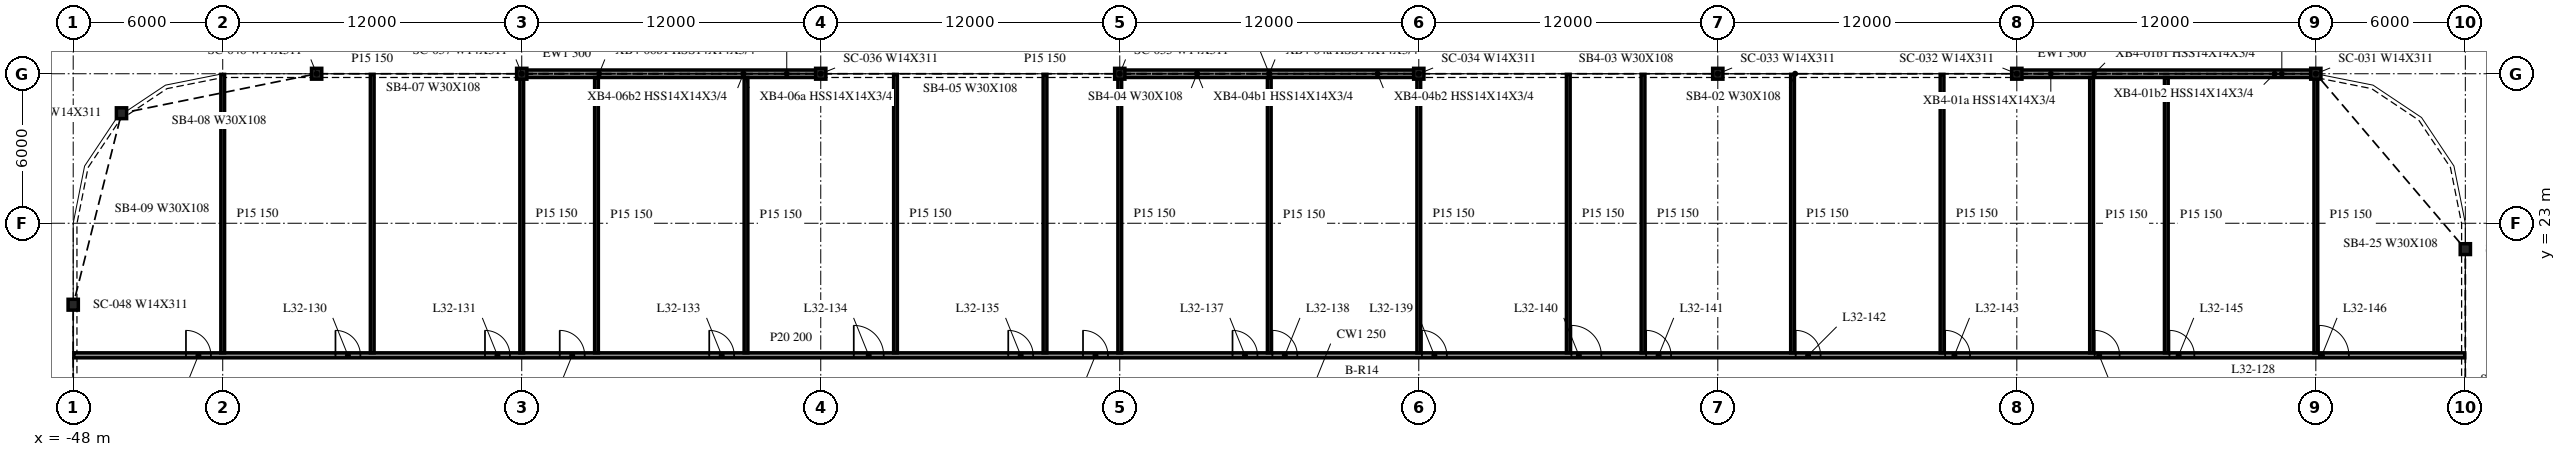
"""IFC4 building model, lengths in metres.
Left out: names, types, materials, properties, quantities, classifications, styles, units other than length and angle.
Written with IfcOpenShell. Run it as: python <this file> out.ifc"""

import sys

from ifc_helpers import new_model, si_unit, direction, frame, frame_2d, origin, origin_2d, place, context, subcontext, project, spatial, rectangle, i_section, extrude, element, fill, save


model = new_model("IFC4")
c1 = context("Model", 3, precision=1e-05, world=origin(), true_north=direction((0.0, 1.0)))
c2 = subcontext(c1, "Body", "Model", "MODEL_VIEW")
j1 = project(units=[si_unit("LENGTHUNIT", "METRE"), si_unit("PLANEANGLEUNIT", "RADIAN")], contexts=[c1])
p1 = place(None, origin())
s1 = spatial("IfcSite", under=j1, at=p1, CompositionType="ELEMENT")
p2 = place(p1, origin())
s2 = spatial("IfcBuilding", under=s1, at=p2, CompositionType="ELEMENT")
p3 = place(p2, frame((0.0, 0.0, 138.4)))
s3 = spatial("IfcBuildingStorey", under=s2, at=p3, CompositionType="ELEMENT", Elevation=138.4)
for number, where, z_axis, x_axis in (
    (1, (42.0, 29.0, -0.34), (0.0, 0.0, 1.0), (1.0, 0.0, 0.0)),
    (2, (30.0, 29.0, -0.34), (0.0, 0.0, 1.0), (1.0, 0.0, 0.0)),
    (3, (18.0, 29.0, -0.34), (0.0, 0.0, 1.0), (1.0, 0.0, 0.0)),
    (4, (6.0, 29.0, -0.34), (0.0, 0.0, 1.0), (1.0, 0.0, 0.0)),
    (5, (-6.0, 29.0, -0.34), (0.0, 0.0, 1.0), (1.0, 0.0, 0.0)),
    (6, (-18.0, 29.0, -0.34), (0.0, 0.0, 1.0), (1.0, 0.0, 0.0)),
    (7, (-30.0, 29.0, -0.34), (0.0, 0.0, 1.0), (1.0, 0.0, 0.0)),
    (8, (-38.231, 29.0, -0.34), (0.0, 0.0, 1.0), (1.0, 0.0, 0.0)),
    (9, (-46.062, 27.416, -0.34), (0.0, 0.0, 1.0), (1.0, 0.0, 0.0)),
    (10, (-48.0, 19.731, -0.34), (0.0, 0.0, 1.0), (1.0, 0.0, 0.0)),
    (11, (48.0, 21.962, -0.34), (0.0, 0.0, 1.0), (1.0, 0.0, 0.0)),
):
    element("IfcColumn", number, at=place(p3, frame(where, z_axis=z_axis, x_axis=x_axis)), inside=s3, PredefinedType="COLUMN", context=c2, shape_type="SweptSolid", body=[
        extrude(i_section(OverallWidth=0.412, OverallDepth=0.434, WebThickness=0.036, FlangeThickness=0.057, at=origin_2d()), origin(), (0.0, 0.0, 1.0), 4.1),
    ])
for number, where, z_axis, x_axis in (
    (12, (41.982, 29.0, 0.0), (0.0, 0.0, 1.0), (-1.0, 0.0, 0.0)),
    (13, (5.982, 29.0, 0.0), (0.0, 0.0, 1.0), (-1.0, 0.0, 0.0)),
    (14, (-18.018, 29.0, 0.0), (0.0, 0.0, 1.0), (-1.0, 0.0, 0.0)),
):
    element("IfcWall", number, at=place(p3, frame(where, z_axis=z_axis, x_axis=x_axis)), inside=s3, PredefinedType="NOTDEFINED", context=c2, shape_type="SweptSolid", body=[
        extrude(rectangle(XDim=11.964, YDim=0.3, at=frame_2d((5.982, 0.0))), origin(), (0.0, 0.0, 1.0), 3.003),
    ])
p4 = place(p3, frame((-47.975, 17.7, 0.0), z_axis=(0.0, 0.0, 1.0), x_axis=(1.0, 0.0, 0.0)))
e15 = element("IfcWall", 15, at=p4, inside=s3, PredefinedType="PARTITIONING", context=c2, shape_type="SweptSolid", body=[
    extrude(rectangle(XDim=95.95, YDim=0.2, at=frame_2d((47.975, 0.0))), origin(), (0.0, 0.0, 1.0), 3.76),
])
p5 = place(p4, frame((4.5, 0.0, 0.0)))
e16 = element("IfcOpeningElement", 16, at=p5, cuts=e15, PredefinedType="OPENING", context=c2, shape_type="SweptSolid", body=[
    extrude(rectangle(XDim=1.0, YDim=2.1, at=frame_2d((0.5, 1.05))), frame((0.0, 0.11, 0.0), z_axis=(0.0, -1.0, 0.0), x_axis=(1.0, 0.0, 0.0)), (0.0, 0.0, 1.0), 0.22),
])
p6 = place(p4, frame((10.5, 0.0, 0.0)))
e17 = element("IfcOpeningElement", 17, at=p6, cuts=e15, PredefinedType="OPENING", context=c2, shape_type="SweptSolid", body=[
    extrude(rectangle(XDim=1.0, YDim=2.1, at=frame_2d((0.5, 1.05))), frame((0.0, 0.11, 0.0), z_axis=(0.0, -1.0, 0.0), x_axis=(1.0, 0.0, 0.0)), (0.0, 0.0, 1.0), 0.22),
])
p7 = place(p4, frame((16.5, 0.0, 0.0)))
e18 = element("IfcOpeningElement", 18, at=p7, cuts=e15, PredefinedType="OPENING", context=c2, shape_type="SweptSolid", body=[
    extrude(rectangle(XDim=1.0, YDim=2.1, at=frame_2d((0.5, 1.05))), frame((0.0, 0.11, 0.0), z_axis=(0.0, -1.0, 0.0), x_axis=(1.0, 0.0, 0.0)), (0.0, 0.0, 1.0), 0.22),
])
p8 = place(p4, frame((19.5, 0.0, 0.0)))
e19 = element("IfcOpeningElement", 19, at=p8, cuts=e15, PredefinedType="OPENING", context=c2, shape_type="SweptSolid", body=[
    extrude(rectangle(XDim=1.0, YDim=2.1, at=frame_2d((0.5, 1.05))), frame((0.0, 0.11, 0.0), z_axis=(0.0, -1.0, 0.0), x_axis=(1.0, 0.0, 0.0)), (0.0, 0.0, 1.0), 0.22),
])
p9 = place(p4, frame((25.5, 0.0, 0.0)))
e20 = element("IfcOpeningElement", 20, at=p9, cuts=e15, PredefinedType="OPENING", context=c2, shape_type="SweptSolid", body=[
    extrude(rectangle(XDim=1.0, YDim=2.1, at=frame_2d((0.5, 1.05))), frame((0.0, 0.11, 0.0), z_axis=(0.0, -1.0, 0.0), x_axis=(1.0, 0.0, 0.0)), (0.0, 0.0, 1.0), 0.22),
])
p10 = place(p4, frame((31.3, 0.0, 0.0)))
e21 = element("IfcOpeningElement", 21, at=p10, cuts=e15, PredefinedType="OPENING", context=c2, shape_type="SweptSolid", body=[
    extrude(rectangle(XDim=1.2, YDim=2.1, at=frame_2d((0.6, 1.05))), frame((0.0, 0.11, 0.0), z_axis=(0.0, -1.0, 0.0), x_axis=(1.0, 0.0, 0.0)), (0.0, 0.0, 1.0), 0.22),
])
p11 = place(p4, frame((37.5, 0.0, 0.0)))
e22 = element("IfcOpeningElement", 22, at=p11, cuts=e15, PredefinedType="OPENING", context=c2, shape_type="SweptSolid", body=[
    extrude(rectangle(XDim=1.0, YDim=2.1, at=frame_2d((0.5, 1.05))), frame((0.0, 0.11, 0.0), z_axis=(0.0, -1.0, 0.0), x_axis=(1.0, 0.0, 0.0)), (0.0, 0.0, 1.0), 0.22),
])
p12 = place(p4, frame((40.5, 0.0, 0.0)))
e23 = element("IfcOpeningElement", 23, at=p12, cuts=e15, PredefinedType="OPENING", context=c2, shape_type="SweptSolid", body=[
    extrude(rectangle(XDim=1.0, YDim=2.1, at=frame_2d((0.5, 1.05))), frame((0.0, 0.11, 0.0), z_axis=(0.0, -1.0, 0.0), x_axis=(1.0, 0.0, 0.0)), (0.0, 0.0, 1.0), 0.22),
])
p13 = place(p4, frame((46.5, 0.0, 0.0)))
e24 = element("IfcOpeningElement", 24, at=p13, cuts=e15, PredefinedType="OPENING", context=c2, shape_type="SweptSolid", body=[
    extrude(rectangle(XDim=1.0, YDim=2.1, at=frame_2d((0.5, 1.05))), frame((0.0, 0.11, 0.0), z_axis=(0.0, -1.0, 0.0), x_axis=(1.0, 0.0, 0.0)), (0.0, 0.0, 1.0), 0.22),
])
p14 = place(p4, frame((48.1, 0.0, 0.0)))
e25 = element("IfcOpeningElement", 25, at=p14, cuts=e15, PredefinedType="OPENING", context=c2, shape_type="SweptSolid", body=[
    extrude(rectangle(XDim=1.0, YDim=2.1, at=frame_2d((0.5, 1.05))), frame((0.0, 0.11, 0.0), z_axis=(0.0, -1.0, 0.0), x_axis=(1.0, 0.0, 0.0)), (0.0, 0.0, 1.0), 0.22),
])
p15 = place(p4, frame((54.1, 0.0, 0.0)))
e26 = element("IfcOpeningElement", 26, at=p15, cuts=e15, PredefinedType="OPENING", context=c2, shape_type="SweptSolid", body=[
    extrude(rectangle(XDim=1.0, YDim=2.1, at=frame_2d((0.5, 1.05))), frame((0.0, 0.11, 0.0), z_axis=(0.0, -1.0, 0.0), x_axis=(1.0, 0.0, 0.0)), (0.0, 0.0, 1.0), 0.22),
])
p16 = place(p4, frame((60.1, 0.0, 0.0)))
e27 = element("IfcOpeningElement", 27, at=p16, cuts=e15, PredefinedType="OPENING", context=c2, shape_type="SweptSolid", body=[
    extrude(rectangle(XDim=1.2, YDim=2.1, at=frame_2d((0.6, 1.05))), frame((0.0, 0.11, 0.0), z_axis=(0.0, -1.0, 0.0), x_axis=(1.0, 0.0, 0.0)), (0.0, 0.0, 1.0), 0.22),
])
p17 = place(p4, frame((63.1, 0.0, 0.0)))
e28 = element("IfcOpeningElement", 28, at=p17, cuts=e15, PredefinedType="OPENING", context=c2, shape_type="SweptSolid", body=[
    extrude(rectangle(XDim=1.0, YDim=2.1, at=frame_2d((0.5, 1.05))), frame((0.0, 0.11, 0.0), z_axis=(0.0, -1.0, 0.0), x_axis=(1.0, 0.0, 0.0)), (0.0, 0.0, 1.0), 0.22),
])
p18 = place(p4, frame((69.1, 0.0, 0.0)))
e29 = element("IfcOpeningElement", 29, at=p18, cuts=e15, PredefinedType="OPENING", context=c2, shape_type="SweptSolid", body=[
    extrude(rectangle(XDim=1.0, YDim=2.1, at=frame_2d((0.5, 1.05))), frame((0.0, 0.11, 0.0), z_axis=(0.0, -1.0, 0.0), x_axis=(1.0, 0.0, 0.0)), (0.0, 0.0, 1.0), 0.22),
])
p19 = place(p4, frame((75.1, 0.0, 0.0)))
e30 = element("IfcOpeningElement", 30, at=p19, cuts=e15, PredefinedType="OPENING", context=c2, shape_type="SweptSolid", body=[
    extrude(rectangle(XDim=1.0, YDim=2.1, at=frame_2d((0.5, 1.05))), frame((0.0, 0.11, 0.0), z_axis=(0.0, -1.0, 0.0), x_axis=(1.0, 0.0, 0.0)), (0.0, 0.0, 1.0), 0.22),
])
p20 = place(p4, frame((81.1, 0.0, 0.0)))
e31 = element("IfcOpeningElement", 31, at=p20, cuts=e15, PredefinedType="OPENING", context=c2, shape_type="SweptSolid", body=[
    extrude(rectangle(XDim=1.0, YDim=2.1, at=frame_2d((0.5, 1.05))), frame((0.0, 0.11, 0.0), z_axis=(0.0, -1.0, 0.0), x_axis=(1.0, 0.0, 0.0)), (0.0, 0.0, 1.0), 0.22),
])
p21 = place(p4, frame((84.1, 0.0, 0.0)))
e32 = element("IfcOpeningElement", 32, at=p21, cuts=e15, PredefinedType="OPENING", context=c2, shape_type="SweptSolid", body=[
    extrude(rectangle(XDim=1.0, YDim=2.1, at=frame_2d((0.5, 1.05))), frame((0.0, 0.11, 0.0), z_axis=(0.0, -1.0, 0.0), x_axis=(1.0, 0.0, 0.0)), (0.0, 0.0, 1.0), 0.22),
])
p22 = place(p4, frame((90.1, 0.0, 0.0)))
e33 = element("IfcOpeningElement", 33, at=p22, cuts=e15, PredefinedType="OPENING", context=c2, shape_type="SweptSolid", body=[
    extrude(rectangle(XDim=1.2, YDim=2.1, at=frame_2d((0.6, 1.05))), frame((0.0, 0.11, 0.0), z_axis=(0.0, -1.0, 0.0), x_axis=(1.0, 0.0, 0.0)), (0.0, 0.0, 1.0), 0.22),
])
for number, where, z_axis, x_axis in (
    (34, (-42.0, 17.8, 0.0), (0.0, 0.0, 1.0), (0.0, 1.0, 0.0)),
    (35, (-36.0, 17.8, 0.0), (0.0, 0.0, 1.0), (0.0, 1.0, 0.0)),
    (36, (-30.0, 17.8, 0.0), (0.0, 0.0, 1.0), (0.0, 1.0, 0.0)),
):
    element("IfcWall", number, at=place(p3, frame(where, z_axis=z_axis, x_axis=x_axis)), inside=s3, PredefinedType="PARTITIONING", context=c2, shape_type="SweptSolid", body=[
        extrude(rectangle(XDim=11.175, YDim=0.15, at=frame_2d((5.587, 0.0))), origin(), (0.0, 0.0, 1.0), 3.76),
    ])
for number, where, z_axis, x_axis in (
    (37, (-27.0, 17.8, 0.0), (0.0, 0.0, 1.0), (0.0, 1.0, 0.0)),
    (38, (-21.0, 17.8, 0.0), (0.0, 0.0, 1.0), (0.0, 1.0, 0.0)),
):
    element("IfcWall", number, at=place(p3, frame(where, z_axis=z_axis, x_axis=x_axis)), inside=s3, PredefinedType="PARTITIONING", context=c2, shape_type="SweptSolid", body=[
        extrude(rectangle(XDim=11.05, YDim=0.15, at=frame_2d((5.525, 0.0))), origin(), (0.0, 0.0, 1.0), 3.76),
    ])
for number, where, z_axis, x_axis in (
    (39, (-15.0, 17.8, 0.0), (0.0, 0.0, 1.0), (0.0, 1.0, 0.0)),
    (40, (-9.0, 17.8, 0.0), (0.0, 0.0, 1.0), (0.0, 1.0, 0.0)),
    (41, (-6.0, 17.8, 0.0), (0.0, 0.0, 1.0), (0.0, 1.0, 0.0)),
):
    element("IfcWall", number, at=place(p3, frame(where, z_axis=z_axis, x_axis=x_axis)), inside=s3, PredefinedType="PARTITIONING", context=c2, shape_type="SweptSolid", body=[
        extrude(rectangle(XDim=11.175, YDim=0.15, at=frame_2d((5.587, 0.0))), origin(), (0.0, 0.0, 1.0), 3.76),
    ])
p23 = place(p3, frame((0.0, 17.8, 0.0), z_axis=(0.0, 0.0, 1.0), x_axis=(0.0, 1.0, 0.0)))
e42 = element("IfcWall", 42, at=p23, inside=s3, PredefinedType="PARTITIONING", context=c2, shape_type="SweptSolid", body=[
    extrude(rectangle(XDim=11.05, YDim=0.15, at=frame_2d((5.525, 0.0))), origin(), (0.0, 0.0, 1.0), 3.76),
])
for number, where, z_axis, x_axis in (
    (43, (6.0, 17.8, 0.0), (0.0, 0.0, 1.0), (0.0, 1.0, 0.0)),
    (44, (12.0, 17.8, 0.0), (0.0, 0.0, 1.0), (0.0, 1.0, 0.0)),
    (45, (15.0, 17.8, 0.0), (0.0, 0.0, 1.0), (0.0, 1.0, 0.0)),
    (46, (21.0, 17.8, 0.0), (0.0, 0.0, 1.0), (0.0, 1.0, 0.0)),
    (47, (27.0, 17.8, 0.0), (0.0, 0.0, 1.0), (0.0, 1.0, 0.0)),
):
    element("IfcWall", number, at=place(p3, frame(where, z_axis=z_axis, x_axis=x_axis)), inside=s3, PredefinedType="PARTITIONING", context=c2, shape_type="SweptSolid", body=[
        extrude(rectangle(XDim=11.175, YDim=0.15, at=frame_2d((5.587, 0.0))), origin(), (0.0, 0.0, 1.0), 3.76),
    ])
for number, where, z_axis, x_axis in (
    (48, (33.0, 17.8, 0.0), (0.0, 0.0, 1.0), (0.0, 1.0, 0.0)),
    (49, (36.0, 17.8, 0.0), (0.0, 0.0, 1.0), (0.0, 1.0, 0.0)),
):
    element("IfcWall", number, at=place(p3, frame(where, z_axis=z_axis, x_axis=x_axis)), inside=s3, PredefinedType="PARTITIONING", context=c2, shape_type="SweptSolid", body=[
        extrude(rectangle(XDim=11.05, YDim=0.15, at=frame_2d((5.525, 0.0))), origin(), (0.0, 0.0, 1.0), 3.76),
    ])
p24 = place(p3, frame((42.0, 17.8, 0.0), z_axis=(0.0, 0.0, 1.0), x_axis=(0.0, 1.0, 0.0)))
e50 = element("IfcWall", 50, at=p24, inside=s3, PredefinedType="PARTITIONING", context=c2, shape_type="SweptSolid", body=[
    extrude(rectangle(XDim=11.047, YDim=0.15, at=frame_2d((5.523, 0.0))), origin(), (0.0, 0.0, 1.0), 3.76),
])
p25 = place(p5, origin())
e51 = element("IfcDoor", 51, at=p25, inside=s3, OperationType="SINGLE_SWING_LEFT", PredefinedType="DOOR", context=c2, shape_type="SweptSolid", body=[
    extrude(rectangle(XDim=1.0, YDim=2.1, at=frame_2d((0.5, 1.05))), frame((0.0, 0.025, 0.0), z_axis=(0.0, -1.0, 0.0), x_axis=(1.0, 0.0, 0.0)), (0.0, 0.0, 1.0), 0.05),
])
fill(e16, e51)
p26 = place(p6, origin())
e52 = element("IfcDoor", 52, at=p26, inside=s3, OperationType="SINGLE_SWING_LEFT", PredefinedType="DOOR", context=c2, shape_type="SweptSolid", body=[
    extrude(rectangle(XDim=1.0, YDim=2.1, at=frame_2d((0.5, 1.05))), frame((0.0, 0.025, 0.0), z_axis=(0.0, -1.0, 0.0), x_axis=(1.0, 0.0, 0.0)), (0.0, 0.0, 1.0), 0.05),
])
fill(e17, e52)
p27 = place(p7, origin())
e53 = element("IfcDoor", 53, at=p27, inside=s3, OperationType="SINGLE_SWING_LEFT", PredefinedType="DOOR", context=c2, shape_type="SweptSolid", body=[
    extrude(rectangle(XDim=1.0, YDim=2.1, at=frame_2d((0.5, 1.05))), frame((0.0, 0.025, 0.0), z_axis=(0.0, -1.0, 0.0), x_axis=(1.0, 0.0, 0.0)), (0.0, 0.0, 1.0), 0.05),
])
fill(e18, e53)
p28 = place(p8, origin())
e54 = element("IfcDoor", 54, at=p28, inside=s3, OperationType="SINGLE_SWING_LEFT", PredefinedType="DOOR", context=c2, shape_type="SweptSolid", body=[
    extrude(rectangle(XDim=1.0, YDim=2.1, at=frame_2d((0.5, 1.05))), frame((0.0, 0.025, 0.0), z_axis=(0.0, -1.0, 0.0), x_axis=(1.0, 0.0, 0.0)), (0.0, 0.0, 1.0), 0.05),
])
fill(e19, e54)
p29 = place(p9, origin())
e55 = element("IfcDoor", 55, at=p29, inside=s3, OperationType="SINGLE_SWING_LEFT", PredefinedType="DOOR", context=c2, shape_type="SweptSolid", body=[
    extrude(rectangle(XDim=1.0, YDim=2.1, at=frame_2d((0.5, 1.05))), frame((0.0, 0.025, 0.0), z_axis=(0.0, -1.0, 0.0), x_axis=(1.0, 0.0, 0.0)), (0.0, 0.0, 1.0), 0.05),
])
fill(e20, e55)
p30 = place(p10, origin())
e56 = element("IfcDoor", 56, at=p30, inside=s3, OperationType="SINGLE_SWING_LEFT", PredefinedType="DOOR", context=c2, shape_type="SweptSolid", body=[
    extrude(rectangle(XDim=1.2, YDim=2.1, at=frame_2d((0.6, 1.05))), frame((0.0, 0.025, 0.0), z_axis=(0.0, -1.0, 0.0), x_axis=(1.0, 0.0, 0.0)), (0.0, 0.0, 1.0), 0.05),
])
fill(e21, e56)
p31 = place(p11, origin())
e57 = element("IfcDoor", 57, at=p31, inside=s3, OperationType="SINGLE_SWING_LEFT", PredefinedType="DOOR", context=c2, shape_type="SweptSolid", body=[
    extrude(rectangle(XDim=1.0, YDim=2.1, at=frame_2d((0.5, 1.05))), frame((0.0, 0.025, 0.0), z_axis=(0.0, -1.0, 0.0), x_axis=(1.0, 0.0, 0.0)), (0.0, 0.0, 1.0), 0.05),
])
fill(e22, e57)
p32 = place(p12, origin())
e58 = element("IfcDoor", 58, at=p32, inside=s3, OperationType="SINGLE_SWING_LEFT", PredefinedType="DOOR", context=c2, shape_type="SweptSolid", body=[
    extrude(rectangle(XDim=1.0, YDim=2.1, at=frame_2d((0.5, 1.05))), frame((0.0, 0.025, 0.0), z_axis=(0.0, -1.0, 0.0), x_axis=(1.0, 0.0, 0.0)), (0.0, 0.0, 1.0), 0.05),
])
fill(e23, e58)
p33 = place(p13, origin())
e59 = element("IfcDoor", 59, at=p33, inside=s3, OperationType="SINGLE_SWING_LEFT", PredefinedType="DOOR", context=c2, shape_type="SweptSolid", body=[
    extrude(rectangle(XDim=1.0, YDim=2.1, at=frame_2d((0.5, 1.05))), frame((0.0, 0.025, 0.0), z_axis=(0.0, -1.0, 0.0), x_axis=(1.0, 0.0, 0.0)), (0.0, 0.0, 1.0), 0.05),
])
fill(e24, e59)
p34 = place(p14, origin())
e60 = element("IfcDoor", 60, at=p34, inside=s3, OperationType="SINGLE_SWING_RIGHT", PredefinedType="DOOR", context=c2, shape_type="SweptSolid", body=[
    extrude(rectangle(XDim=1.0, YDim=2.1, at=frame_2d((0.5, 1.05))), frame((0.0, 0.025, 0.0), z_axis=(0.0, -1.0, 0.0), x_axis=(1.0, 0.0, 0.0)), (0.0, 0.0, 1.0), 0.05),
])
fill(e25, e60)
p35 = place(p15, origin())
e61 = element("IfcDoor", 61, at=p35, inside=s3, OperationType="SINGLE_SWING_RIGHT", PredefinedType="DOOR", context=c2, shape_type="SweptSolid", body=[
    extrude(rectangle(XDim=1.0, YDim=2.1, at=frame_2d((0.5, 1.05))), frame((0.0, 0.025, 0.0), z_axis=(0.0, -1.0, 0.0), x_axis=(1.0, 0.0, 0.0)), (0.0, 0.0, 1.0), 0.05),
])
fill(e26, e61)
p36 = place(p16, origin())
e62 = element("IfcDoor", 62, at=p36, inside=s3, OperationType="SINGLE_SWING_RIGHT", PredefinedType="DOOR", context=c2, shape_type="SweptSolid", body=[
    extrude(rectangle(XDim=1.2, YDim=2.1, at=frame_2d((0.6, 1.05))), frame((0.0, 0.025, 0.0), z_axis=(0.0, -1.0, 0.0), x_axis=(1.0, 0.0, 0.0)), (0.0, 0.0, 1.0), 0.05),
])
fill(e27, e62)
p37 = place(p17, origin())
e63 = element("IfcDoor", 63, at=p37, inside=s3, OperationType="SINGLE_SWING_RIGHT", PredefinedType="DOOR", context=c2, shape_type="SweptSolid", body=[
    extrude(rectangle(XDim=1.0, YDim=2.1, at=frame_2d((0.5, 1.05))), frame((0.0, 0.025, 0.0), z_axis=(0.0, -1.0, 0.0), x_axis=(1.0, 0.0, 0.0)), (0.0, 0.0, 1.0), 0.05),
])
fill(e28, e63)
p38 = place(p18, origin())
e64 = element("IfcDoor", 64, at=p38, inside=s3, OperationType="SINGLE_SWING_RIGHT", PredefinedType="DOOR", context=c2, shape_type="SweptSolid", body=[
    extrude(rectangle(XDim=1.0, YDim=2.1, at=frame_2d((0.5, 1.05))), frame((0.0, 0.025, 0.0), z_axis=(0.0, -1.0, 0.0), x_axis=(1.0, 0.0, 0.0)), (0.0, 0.0, 1.0), 0.05),
])
fill(e29, e64)
p39 = place(p19, origin())
e65 = element("IfcDoor", 65, at=p39, inside=s3, OperationType="SINGLE_SWING_RIGHT", PredefinedType="DOOR", context=c2, shape_type="SweptSolid", body=[
    extrude(rectangle(XDim=1.0, YDim=2.1, at=frame_2d((0.5, 1.05))), frame((0.0, 0.025, 0.0), z_axis=(0.0, -1.0, 0.0), x_axis=(1.0, 0.0, 0.0)), (0.0, 0.0, 1.0), 0.05),
])
fill(e30, e65)
p40 = place(p20, origin())
e66 = element("IfcDoor", 66, at=p40, inside=s3, OperationType="SINGLE_SWING_RIGHT", PredefinedType="DOOR", context=c2, shape_type="SweptSolid", body=[
    extrude(rectangle(XDim=1.0, YDim=2.1, at=frame_2d((0.5, 1.05))), frame((0.0, 0.025, 0.0), z_axis=(0.0, -1.0, 0.0), x_axis=(1.0, 0.0, 0.0)), (0.0, 0.0, 1.0), 0.05),
])
fill(e31, e66)
p41 = place(p21, origin())
e67 = element("IfcDoor", 67, at=p41, inside=s3, OperationType="SINGLE_SWING_RIGHT", PredefinedType="DOOR", context=c2, shape_type="SweptSolid", body=[
    extrude(rectangle(XDim=1.0, YDim=2.1, at=frame_2d((0.5, 1.05))), frame((0.0, 0.025, 0.0), z_axis=(0.0, -1.0, 0.0), x_axis=(1.0, 0.0, 0.0)), (0.0, 0.0, 1.0), 0.05),
])
fill(e32, e67)
p42 = place(p22, origin())
e68 = element("IfcDoor", 68, at=p42, inside=s3, OperationType="SINGLE_SWING_RIGHT", PredefinedType="DOOR", context=c2, shape_type="SweptSolid", body=[
    extrude(rectangle(XDim=1.2, YDim=2.1, at=frame_2d((0.6, 1.05))), frame((0.0, 0.025, 0.0), z_axis=(0.0, -1.0, 0.0), x_axis=(1.0, 0.0, 0.0)), (0.0, 0.0, 1.0), 0.05),
])
fill(e33, e68)
save(model, sys.argv[1])
